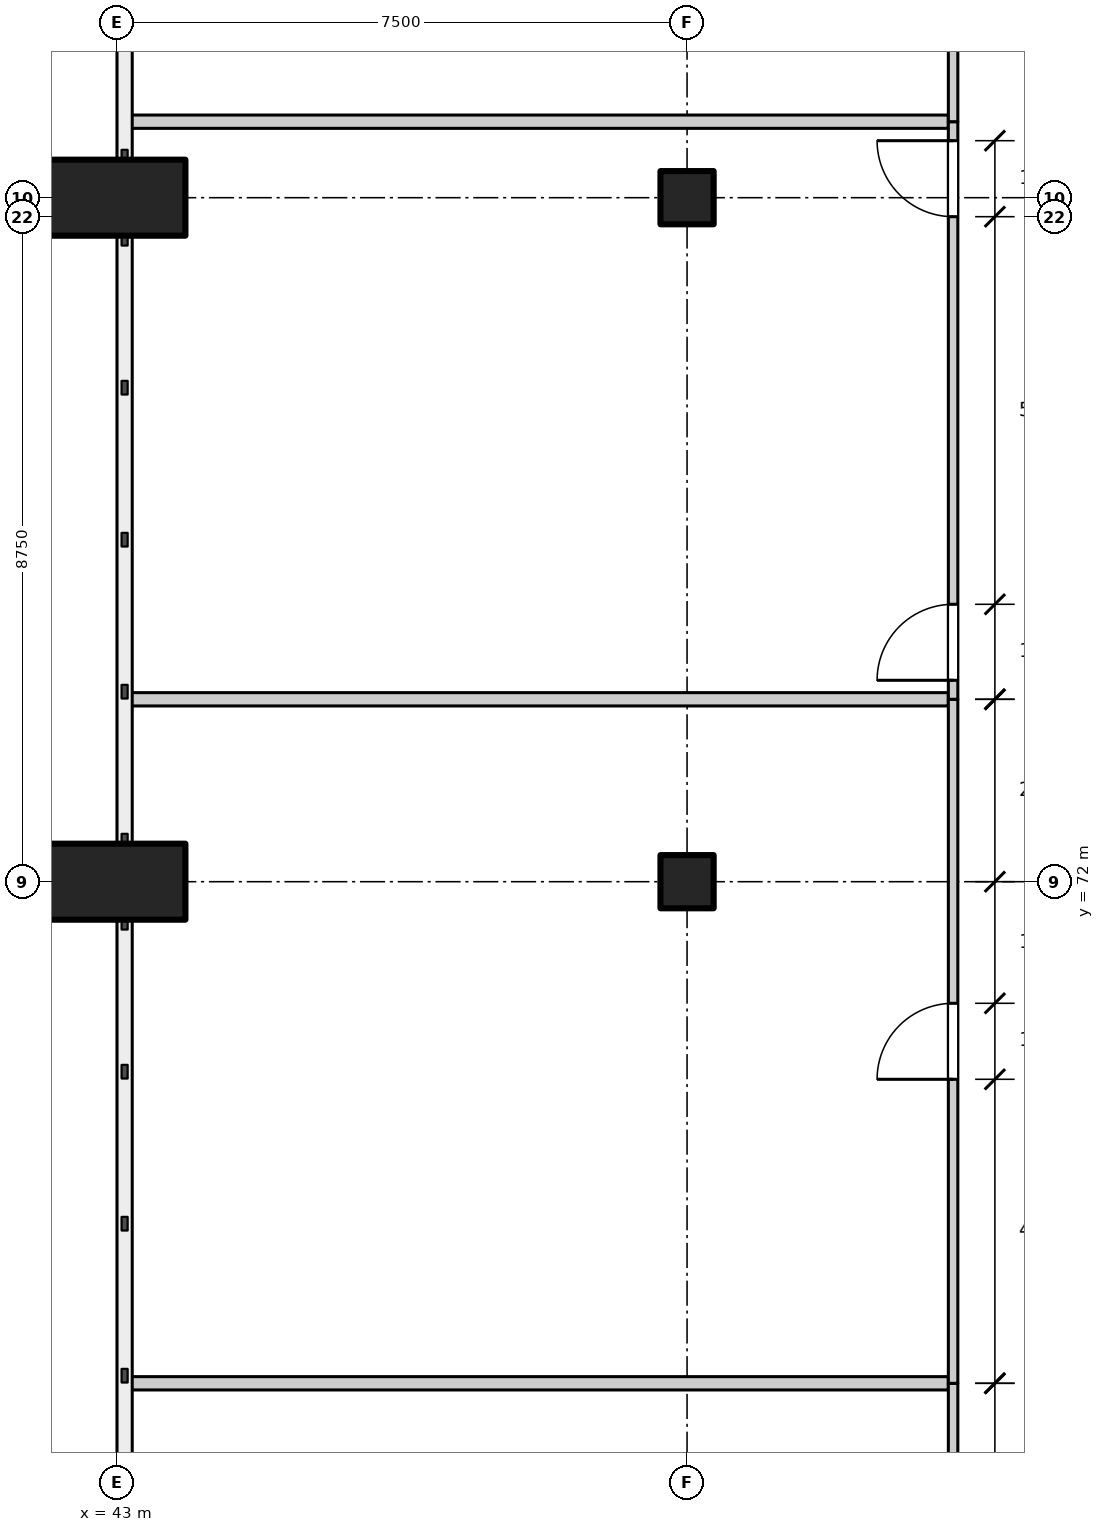
"""IFC4 building model, lengths in metres.
Left out: names, types, materials, properties, quantities, classifications, styles, units other than length and angle.
Written with IfcOpenShell. Run it as: python <this file> out.ifc"""

import sys

from ifc_helpers import new_model, si_unit, direction, frame, frame_2d, origin, origin_2d, place, context, subcontext, project, spatial, rectangle, extrude, element, fill, save


model = new_model("IFC4")
c1 = context("Model", 3, precision=1e-05, world=origin(), true_north=direction((0.0, 1.0)))
c2 = subcontext(c1, "Body", "Model", "MODEL_VIEW")
j1 = project(units=[si_unit("LENGTHUNIT", "METRE"), si_unit("PLANEANGLEUNIT", "RADIAN")], contexts=[c1])
p1 = place(None, origin())
s1 = spatial("IfcSite", under=j1, at=p1, CompositionType="ELEMENT")
p2 = place(p1, origin())
s2 = spatial("IfcBuilding", under=s1, at=p2, CompositionType="ELEMENT")
p3 = place(p2, frame((0.0, 0.0, 10.2)))
s3 = spatial("IfcBuildingStorey", under=s2, at=p3, CompositionType="ELEMENT", Elevation=10.2)
for number, where, z_axis, x_axis in (
    (1, (50.5, 72.0, 0.0), (0.0, 0.0, 1.0), (1.0, 0.0, 0.0)),
    (2, (50.5, 81.0, 0.0), (0.0, 0.0, 1.0), (1.0, 0.0, 0.0)),
):
    element("IfcColumn", number, at=place(p3, frame(where, z_axis=z_axis, x_axis=x_axis)), inside=s3, PredefinedType="COLUMN", context=c2, shape_type="SweptSolid", body=[
        extrude(rectangle(XDim=0.7, YDim=0.7, at=origin_2d()), origin(), (0.0, 0.0, 1.0), 3.9),
    ])
for number, where, z_axis, x_axis in (
    (3, (43.0, 72.0, 0.0), (0.0, 0.0, 1.0), (1.0, 0.0, 0.0)),
    (4, (43.0, 81.0, 0.0), (0.0, 0.0, 1.0), (1.0, 0.0, 0.0)),
):
    element("IfcColumn", number, at=place(p3, frame(where, z_axis=z_axis, x_axis=x_axis)), inside=s3, PredefinedType="COLUMN", context=c2, shape_type="SweptSolid", body=[
        extrude(rectangle(XDim=1.8, YDim=1.0, at=origin_2d()), origin(), (0.0, 0.0, 1.0), 4.2),
    ])
for number, where, z_axis, x_axis in (
    (5, (43.15, 65.4, 0.0), (0.0, 0.0, 1.0), (1.0, 0.0, 0.0)),
    (6, (43.15, 74.4, 0.0), (0.0, 0.0, 1.0), (1.0, 0.0, 0.0)),
    (7, (43.15, 82.0, 0.0), (0.0, 0.0, 1.0), (1.0, 0.0, 0.0)),
):
    element("IfcWall", number, at=place(p3, frame(where, z_axis=z_axis, x_axis=x_axis)), inside=s3, PredefinedType="PARTITIONING", context=c2, shape_type="SweptSolid", body=[
        extrude(rectangle(XDim=10.788, YDim=0.175, at=frame_2d((5.394, 0.0))), origin(), (0.0, 0.0, 1.0), 3.9),
    ])
p4 = place(p3, frame((54.0, 56.4, 0.0), z_axis=(0.0, 0.0, 1.0), x_axis=(0.0, 1.0, 0.0)))
e8 = element("IfcWall", 8, at=p4, inside=s3, PredefinedType="PARTITIONING", context=c2, shape_type="SweptSolid", body=[
    extrude(rectangle(XDim=9.0, YDim=0.125, at=frame_2d((4.5, 0.0))), origin(), (0.0, 0.0, 1.0), 3.15),
])
p5 = place(p4, frame((4.0, 0.0, 0.0)))
e9 = element("IfcOpeningElement", 9, at=p5, cuts=e8, PredefinedType="OPENING", context=c2, shape_type="SweptSolid", body=[
    extrude(rectangle(XDim=1.0, YDim=2.1, at=frame_2d((0.5, 1.05))), frame((0.0, 0.073, 0.0), z_axis=(0.0, -1.0, 0.0), x_axis=(1.0, 0.0, 0.0)), (0.0, 0.0, 1.0), 0.145),
])
p6 = place(p3, frame((54.0, 65.4, 0.0), z_axis=(0.0, 0.0, 1.0), x_axis=(0.0, 1.0, 0.0)))
e10 = element("IfcWall", 10, at=p6, inside=s3, PredefinedType="PARTITIONING", context=c2, shape_type="SweptSolid", body=[
    extrude(rectangle(XDim=9.0, YDim=0.125, at=frame_2d((4.5, 0.0))), origin(), (0.0, 0.0, 1.0), 3.15),
])
p7 = place(p6, frame((4.0, 0.0, 0.0)))
e11 = element("IfcOpeningElement", 11, at=p7, cuts=e10, PredefinedType="OPENING", context=c2, shape_type="SweptSolid", body=[
    extrude(rectangle(XDim=1.0, YDim=2.1, at=frame_2d((0.5, 1.05))), frame((0.0, 0.073, 0.0), z_axis=(0.0, -1.0, 0.0), x_axis=(1.0, 0.0, 0.0)), (0.0, 0.0, 1.0), 0.145),
])
p8 = place(p3, frame((54.0, 74.4, 0.0), z_axis=(0.0, 0.0, 1.0), x_axis=(0.0, 1.0, 0.0)))
e12 = element("IfcWall", 12, at=p8, inside=s3, PredefinedType="PARTITIONING", context=c2, shape_type="SweptSolid", body=[
    extrude(rectangle(XDim=7.6, YDim=0.125, at=frame_2d((3.8, 0.0))), origin(), (0.0, 0.0, 1.0), 3.15),
])
p9 = place(p8, frame((0.25, 0.0, 0.0)))
e13 = element("IfcOpeningElement", 13, at=p9, cuts=e12, PredefinedType="OPENING", context=c2, shape_type="SweptSolid", body=[
    extrude(rectangle(XDim=1.0, YDim=2.1, at=frame_2d((0.5, 1.05))), frame((0.0, 0.073, 0.0), z_axis=(0.0, -1.0, 0.0), x_axis=(1.0, 0.0, 0.0)), (0.0, 0.0, 1.0), 0.145),
])
p10 = place(p8, frame((6.35, 0.0, 0.0)))
e14 = element("IfcOpeningElement", 14, at=p10, cuts=e12, PredefinedType="OPENING", context=c2, shape_type="SweptSolid", body=[
    extrude(rectangle(XDim=1.0, YDim=2.1, at=frame_2d((0.5, 1.05))), frame((0.0, 0.073, 0.0), z_axis=(0.0, -1.0, 0.0), x_axis=(1.0, 0.0, 0.0)), (0.0, 0.0, 1.0), 0.145),
])
p11 = place(p3, frame((54.0, 82.0, 0.0), z_axis=(0.0, 0.0, 1.0), x_axis=(0.0, 1.0, 0.0)))
e15 = element("IfcWall", 15, at=p11, inside=s3, PredefinedType="PARTITIONING", context=c2, shape_type="SweptSolid", body=[
    extrude(rectangle(XDim=6.938, YDim=0.125, at=frame_2d((3.469, 0.0))), origin(), (0.0, 0.0, 1.0), 3.15),
])
p12 = place(p7, origin())
e16 = element("IfcDoor", 16, at=p12, inside=s3, OperationType="SINGLE_SWING_LEFT", PredefinedType="DOOR", context=c2, shape_type="SweptSolid", body=[
    extrude(rectangle(XDim=1.0, YDim=2.1, at=frame_2d((0.5, 1.05))), frame((0.0, 0.025, 0.0), z_axis=(0.0, -1.0, 0.0), x_axis=(1.0, 0.0, 0.0)), (0.0, 0.0, 1.0), 0.05),
])
fill(e11, e16)
p13 = place(p9, origin())
e17 = element("IfcDoor", 17, at=p13, inside=s3, OperationType="SINGLE_SWING_LEFT", PredefinedType="DOOR", context=c2, shape_type="SweptSolid", body=[
    extrude(rectangle(XDim=1.0, YDim=2.1, at=frame_2d((0.5, 1.05))), frame((0.0, 0.025, 0.0), z_axis=(0.0, -1.0, 0.0), x_axis=(1.0, 0.0, 0.0)), (0.0, 0.0, 1.0), 0.05),
])
fill(e13, e17)
p14 = place(p10, origin())
e18 = element("IfcDoor", 18, at=p14, inside=s3, OperationType="SINGLE_SWING_RIGHT", PredefinedType="DOOR", context=c2, shape_type="SweptSolid", body=[
    extrude(rectangle(XDim=1.0, YDim=2.1, at=frame_2d((0.5, 1.05))), frame((0.0, 0.025, 0.0), z_axis=(0.0, -1.0, 0.0), x_axis=(1.0, 0.0, 0.0)), (0.0, 0.0, 1.0), 0.05),
])
fill(e14, e18)
save(model, sys.argv[1])
